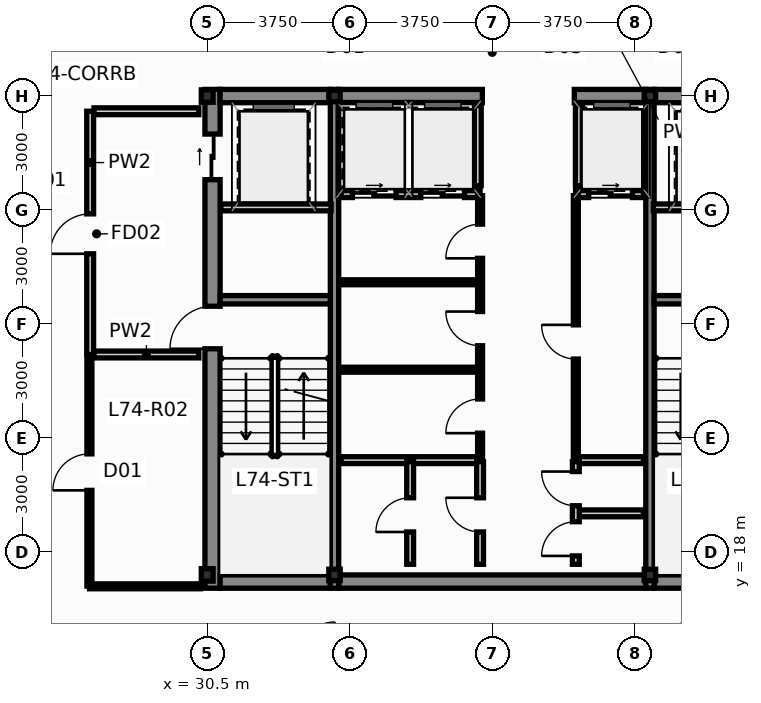
"""IFC4 building model, lengths in metres.
Left out: names, types, materials, properties, quantities, classifications, styles, units other than length and angle.
Written with IfcOpenShell. Run it as: python <this file> out.ifc"""

import sys

from ifc_helpers import new_model, si_unit, direction, frame, frame_2d, origin, origin_2d, place, context, subcontext, project, spatial, rectangle, hollow_rectangle, i_section, extrude, source, transform, mapped, element, fill, save


model = new_model("IFC4")
c1 = context("Model", 3, precision=1e-05, world=origin(), true_north=direction((0.0, 1.0)))
c2 = subcontext(c1, "Body", "Model", "MODEL_VIEW")
j1 = project(units=[si_unit("LENGTHUNIT", "METRE"), si_unit("PLANEANGLEUNIT", "RADIAN")], contexts=[c1])
p1 = place(None, origin())
s1 = spatial("IfcSite", under=j1, at=p1, CompositionType="ELEMENT")
p2 = place(p1, origin())
s2 = spatial("IfcBuilding", under=s1, at=p2, CompositionType="ELEMENT")
p3 = place(p2, frame((0.0, 0.0, 280.95)))
s3 = spatial("IfcBuildingStorey", under=s2, at=p3, CompositionType="ELEMENT", Elevation=280.95)
m1 = source(origin(), c2, "Body", "SweptSolid", [
    extrude(i_section(OverallWidth=0.311, OverallDepth=0.327, WebThickness=0.016, FlangeThickness=0.025, at=origin_2d()), origin(), (0.0, 0.0, 1.0), 3.65),
])
for number, where, z_axis, x_axis in (
    (1, (30.5, 17.4, 0.0), (0.0, 0.0, 1.0), (1.0, 0.0, 0.0)),
    (2, (30.5, 30.0, 0.0), (0.0, 0.0, 1.0), (1.0, 0.0, 0.0)),
):
    element("IfcColumn", number, at=place(p3, frame(where, z_axis=z_axis, x_axis=x_axis)), inside=s3, PredefinedType="COLUMN", context=c2, shape_type="MappedRepresentation", body=[
        mapped(m1, transform((0.0, 0.0, 0.0), scale=1.0)),
    ])
m2 = source(origin(), c2, "Body", "SweptSolid", [
    extrude(hollow_rectangle(XDim=0.3, YDim=0.3, WallThickness=0.012, at=origin_2d()), origin(), (0.0, 0.0, 1.0), 3.65),
])
for number, where, z_axis, x_axis in (
    (3, (33.85, 17.4, 0.0), (0.0, 0.0, 1.0), (1.0, 0.0, 0.0)),
    (4, (42.15, 17.4, 0.0), (0.0, 0.0, 1.0), (1.0, 0.0, 0.0)),
    (5, (33.85, 30.0, 0.0), (0.0, 0.0, 1.0), (1.0, 0.0, 0.0)),
    (6, (42.15, 30.0, 0.0), (0.0, 0.0, 1.0), (1.0, 0.0, 0.0)),
):
    element("IfcColumn", number, at=place(p3, frame(where, z_axis=z_axis, x_axis=x_axis)), inside=s3, PredefinedType="COLUMN", context=c2, shape_type="MappedRepresentation", body=[
        mapped(m2, transform((0.0, 0.0, 0.0), scale=1.0)),
    ])
p4 = place(p3, frame((30.64, 17.05, 0.0), z_axis=(0.0, 0.0, 1.0), x_axis=(0.0, 1.0, 0.0)))
e7 = element("IfcWall", 7, at=p4, inside=s3, PredefinedType="SHEAR", context=c2, shape_type="SweptSolid", body=[
    extrude(rectangle(XDim=13.125, YDim=0.4, at=frame_2d((6.562, 0.0))), origin(), (0.0, 0.0, 1.0), 3.65),
])
p5 = place(p4, frame((6.3, 0.0, 0.0)))
e8 = element("IfcOpeningElement", 8, at=p5, cuts=e7, PredefinedType="OPENING", context=c2, shape_type="SweptSolid", body=[
    extrude(rectangle(XDim=1.12, YDim=2.15, at=frame_2d((0.56, 1.075))), frame((0.0, 0.212, 0.0), z_axis=(0.0, -1.0, 0.0), x_axis=(1.0, 0.0, 0.0)), (0.0, 0.0, 1.0), 0.424),
])
p6 = place(p4, frame((10.75, 0.0, 0.0)))
e9 = element("IfcOpeningElement", 9, at=p6, cuts=e7, PredefinedType="OPENING", context=c2, shape_type="SweptSolid", body=[
    extrude(rectangle(XDim=1.2, YDim=2.2, at=frame_2d((0.6, 1.1))), frame((0.0, 0.212, 0.0), z_axis=(0.0, -1.0, 0.0), x_axis=(1.0, 0.0, 0.0)), (0.0, 0.0, 1.0), 0.424),
])
p7 = place(p3, frame((30.84, 17.225, 0.0), z_axis=(0.0, 0.0, 1.0), x_axis=(1.0, 0.0, 0.0)))
e10 = element("IfcWall", 10, at=p7, inside=s3, PredefinedType="SHEAR", context=c2, shape_type="SweptSolid", body=[
    extrude(rectangle(XDim=2.9, YDim=0.35, at=frame_2d((1.45, 0.0))), origin(), (0.0, 0.0, 1.0), 3.65),
])
p8 = place(p3, frame((33.96, 17.225, 0.0), z_axis=(0.0, 0.0, 1.0), x_axis=(1.0, 0.0, 0.0)))
e11 = element("IfcWall", 11, at=p8, inside=s3, PredefinedType="SHEAR", context=c2, shape_type="SweptSolid", body=[
    extrude(rectangle(XDim=8.08, YDim=0.35, at=frame_2d((4.04, 0.0))), origin(), (0.0, 0.0, 1.0), 3.65),
])
for number, where, z_axis, x_axis in (
    (12, (42.26, 17.225, 0.0), (0.0, 0.0, 1.0), (1.0, 0.0, 0.0)),
    (13, (30.84, 30.0, 0.0), (0.0, 0.0, 1.0), (1.0, 0.0, 0.0)),
):
    element("IfcWall", number, at=place(p3, frame(where, z_axis=z_axis, x_axis=x_axis)), inside=s3, PredefinedType="SHEAR", context=c2, shape_type="SweptSolid", body=[
        extrude(rectangle(XDim=2.9, YDim=0.35, at=frame_2d((1.45, 0.0))), origin(), (0.0, 0.0, 1.0), 3.65),
    ])
p9 = place(p3, frame((33.96, 30.0, 0.0), z_axis=(0.0, 0.0, 1.0), x_axis=(1.0, 0.0, 0.0)))
e14 = element("IfcWall", 14, at=p9, inside=s3, PredefinedType="SHEAR", context=c2, shape_type="SweptSolid", body=[
    extrude(rectangle(XDim=3.78, YDim=0.35, at=frame_2d((1.89, 0.0))), origin(), (0.0, 0.0, 1.0), 3.65),
])
p10 = place(p3, frame((40.16, 30.0, 0.0), z_axis=(0.0, 0.0, 1.0), x_axis=(1.0, 0.0, 0.0)))
e15 = element("IfcWall", 15, at=p10, inside=s3, PredefinedType="SHEAR", context=c2, shape_type="SweptSolid", body=[
    extrude(rectangle(XDim=1.88, YDim=0.35, at=frame_2d((0.94, 0.0))), origin(), (0.0, 0.0, 1.0), 3.65),
])
p11 = place(p3, frame((42.26, 30.0, 0.0), z_axis=(0.0, 0.0, 1.0), x_axis=(1.0, 0.0, 0.0)))
e16 = element("IfcWall", 16, at=p11, inside=s3, PredefinedType="SHEAR", context=c2, shape_type="SweptSolid", body=[
    extrude(rectangle(XDim=2.9, YDim=0.35, at=frame_2d((1.45, 0.0))), origin(), (0.0, 0.0, 1.0), 3.65),
])
for number, where, z_axis, x_axis in (
    (17, (33.85, 17.05, 0.0), (0.0, 0.0, 1.0), (0.0, 1.0, 0.0)),
    (18, (42.15, 17.05, 0.0), (0.0, 0.0, 1.0), (0.0, 1.0, 0.0)),
):
    element("IfcWall", number, at=place(p3, frame(where, z_axis=z_axis, x_axis=x_axis)), inside=s3, PredefinedType="SHEAR", context=c2, shape_type="SweptSolid", body=[
        extrude(rectangle(XDim=13.125, YDim=0.22, at=frame_2d((6.562, 0.0))), origin(), (0.0, 0.0, 1.0), 3.65),
    ])
for number, where, z_axis, x_axis in (
    (19, (30.84, 24.64, 0.0), (0.0, 0.0, 1.0), (1.0, 0.0, 0.0)),
    (20, (42.26, 24.64, 0.0), (0.0, 0.0, 1.0), (1.0, 0.0, 0.0)),
):
    element("IfcWall", number, at=place(p3, frame(where, z_axis=z_axis, x_axis=x_axis)), inside=s3, PredefinedType="SHEAR", context=c2, shape_type="SweptSolid", body=[
        extrude(rectangle(XDim=2.9, YDim=0.22, at=frame_2d((1.45, 0.0))), origin(), (0.0, 0.0, 1.0), 3.65),
    ])
p12 = place(p3, frame((34.02, 27.42, 0.0), z_axis=(0.0, 0.0, 1.0), x_axis=(1.0, 0.0, 0.0)))
e21 = element("IfcWall", 21, at=p12, inside=s3, PredefinedType="PARTITIONING", context=c2, shape_type="SweptSolid", body=[
    extrude(rectangle(XDim=3.66, YDim=0.18, at=frame_2d((1.83, 0.0))), origin(), (0.0, 0.0, 1.0), 3.25),
])
p13 = place(p12, frame((0.3, 0.0, 0.0)))
e22 = element("IfcOpeningElement", 22, at=p13, cuts=e21, PredefinedType="OPENING", context=c2, shape_type="SweptSolid", body=[
    extrude(rectangle(XDim=1.15, YDim=2.2, at=frame_2d((0.575, 1.1))), frame((0.0, 0.102, 0.0), z_axis=(0.0, -1.0, 0.0), x_axis=(1.0, 0.0, 0.0)), (0.0, 0.0, 1.0), 0.204),
])
p14 = place(p12, frame((2.1, 0.0, 0.0)))
e23 = element("IfcOpeningElement", 23, at=p14, cuts=e21, PredefinedType="OPENING", context=c2, shape_type="SweptSolid", body=[
    extrude(rectangle(XDim=1.15, YDim=2.2, at=frame_2d((0.575, 1.1))), frame((0.0, 0.102, 0.0), z_axis=(0.0, -1.0, 0.0), x_axis=(1.0, 0.0, 0.0)), (0.0, 0.0, 1.0), 0.204),
])
p15 = place(p3, frame((40.22, 27.42, 0.0), z_axis=(0.0, 0.0, 1.0), x_axis=(1.0, 0.0, 0.0)))
e24 = element("IfcWall", 24, at=p15, inside=s3, PredefinedType="PARTITIONING", context=c2, shape_type="SweptSolid", body=[
    extrude(rectangle(XDim=1.76, YDim=0.18, at=frame_2d((0.88, 0.0))), origin(), (0.0, 0.0, 1.0), 3.25),
])
p16 = place(p15, frame((0.32, 0.0, 0.0)))
e25 = element("IfcOpeningElement", 25, at=p16, cuts=e24, PredefinedType="OPENING", context=c2, shape_type="SweptSolid", body=[
    extrude(rectangle(XDim=1.15, YDim=2.2, at=frame_2d((0.575, 1.1))), frame((0.0, 0.102, 0.0), z_axis=(0.0, -1.0, 0.0), x_axis=(1.0, 0.0, 0.0)), (0.0, 0.0, 1.0), 0.204),
])
for number, where, z_axis, x_axis in (
    (26, (37.62, 27.64, 0.0), (0.0, 0.0, 1.0), (0.0, 1.0, 0.0)),
    (27, (40.28, 27.64, 0.0), (0.0, 0.0, 1.0), (0.0, 1.0, 0.0)),
):
    element("IfcWall", number, at=place(p3, frame(where, z_axis=z_axis, x_axis=x_axis)), inside=s3, PredefinedType="PARTITIONING", context=c2, shape_type="SweptSolid", body=[
        extrude(rectangle(XDim=2.11, YDim=0.18, at=frame_2d((1.055, 0.0))), origin(), (0.0, 0.0, 1.0), 3.25),
    ])
p17 = place(p3, frame((27.42, 23.2, 0.0), z_axis=(0.0, 0.0, 1.0), x_axis=(0.0, 1.0, 0.0)))
e28 = element("IfcWall", 28, at=p17, inside=s3, PredefinedType="PARTITIONING", context=c2, shape_type="SweptSolid", body=[
    extrude(rectangle(XDim=6.4, YDim=0.18, at=frame_2d((3.2, 0.0))), origin(), (0.0, 0.0, 1.0), 2.979),
])
p18 = place(p17, frame((2.65, 0.0, 0.0)))
e29 = element("IfcOpeningElement", 29, at=p18, cuts=e28, PredefinedType="OPENING", context=c2, shape_type="SweptSolid", body=[
    extrude(rectangle(XDim=1.05, YDim=2.15, at=frame_2d((0.525, 1.075))), frame((0.0, 0.102, 0.0), z_axis=(0.0, -1.0, 0.0), x_axis=(1.0, 0.0, 0.0)), (0.0, 0.0, 1.0), 0.204),
])
for number, where, z_axis, x_axis in (
    (30, (27.52, 23.2, 0.0), (0.0, 0.0, 1.0), (1.0, 0.0, 0.0)),
    (31, (27.52, 29.6, 0.0), (0.0, 0.0, 1.0), (1.0, 0.0, 0.0)),
):
    element("IfcWall", number, at=place(p3, frame(where, z_axis=z_axis, x_axis=x_axis)), inside=s3, PredefinedType="PARTITIONING", context=c2, shape_type="SweptSolid", body=[
        extrude(rectangle(XDim=2.76, YDim=0.18, at=frame_2d((1.38, 0.0))), origin(), (0.0, 0.0, 1.0), 3.25),
    ])
for number, where, z_axis, x_axis in (
    (32, (30.86, 27.07, 0.0), (0.0, 0.0, 1.0), (1.0, 0.0, 0.0)),
    (33, (42.24, 27.07, 0.0), (0.0, 0.0, 1.0), (1.0, 0.0, 0.0)),
):
    element("IfcWall", number, at=place(p3, frame(where, z_axis=z_axis, x_axis=x_axis)), inside=s3, PredefinedType="PARTITIONING", context=c2, shape_type="SweptSolid", body=[
        extrude(rectangle(XDim=2.9, YDim=0.18, at=frame_2d((1.45, 0.0))), origin(), (0.0, 0.0, 1.0), 3.25),
    ])
p19 = place(p3, frame((34.02, 20.42, 0.0), z_axis=(0.0, 0.0, 1.0), x_axis=(1.0, 0.0, 0.0)))
e34 = element("IfcWall", 34, at=p19, inside=s3, PredefinedType="PARTITIONING", context=c2, shape_type="SweptSolid", body=[
    extrude(rectangle(XDim=3.64, YDim=0.18, at=frame_2d((1.82, 0.0))), origin(), (0.0, 0.0, 1.0), 3.25),
])
p20 = place(p3, frame((40.22, 20.42, 0.0), z_axis=(0.0, 0.0, 1.0), x_axis=(1.0, 0.0, 0.0)))
e35 = element("IfcWall", 35, at=p20, inside=s3, PredefinedType="PARTITIONING", context=c2, shape_type="SweptSolid", body=[
    extrude(rectangle(XDim=1.76, YDim=0.18, at=frame_2d((0.88, 0.0))), origin(), (0.0, 0.0, 1.0), 3.25),
])
for number, where, z_axis, x_axis in (
    (36, (34.02, 22.8, 0.0), (0.0, 0.0, 1.0), (1.0, 0.0, 0.0)),
    (37, (34.02, 25.1, 0.0), (0.0, 0.0, 1.0), (1.0, 0.0, 0.0)),
):
    element("IfcWall", number, at=place(p3, frame(where, z_axis=z_axis, x_axis=x_axis)), inside=s3, PredefinedType="PARTITIONING", context=c2, shape_type="SweptSolid", body=[
        extrude(rectangle(XDim=3.58, YDim=0.13, at=frame_2d((1.79, 0.0))), origin(), (0.0, 0.0, 1.0), 3.25),
    ])
p21 = place(p3, frame((37.68, 20.48, 0.0), z_axis=(0.0, 0.0, 1.0), x_axis=(0.0, 1.0, 0.0)))
e38 = element("IfcWall", 38, at=p21, inside=s3, PredefinedType="PARTITIONING", context=c2, shape_type="SweptSolid", body=[
    extrude(rectangle(XDim=6.9, YDim=0.13, at=frame_2d((3.45, 0.0))), origin(), (0.0, 0.0, 1.0), 3.25),
])
p22 = place(p21, frame((0.65, 0.0, 0.0)))
e39 = element("IfcOpeningElement", 39, at=p22, cuts=e38, PredefinedType="OPENING", context=c2, shape_type="SweptSolid", body=[
    extrude(rectangle(XDim=0.9, YDim=2.1, at=frame_2d((0.45, 1.05))), frame((0.0, 0.077, 0.0), z_axis=(0.0, -1.0, 0.0), x_axis=(1.0, 0.0, 0.0)), (0.0, 0.0, 1.0), 0.154),
])
p23 = place(p21, frame((2.95, 0.0, 0.0)))
e40 = element("IfcOpeningElement", 40, at=p23, cuts=e38, PredefinedType="OPENING", context=c2, shape_type="SweptSolid", body=[
    extrude(rectangle(XDim=0.9, YDim=2.1, at=frame_2d((0.45, 1.05))), frame((0.0, 0.077, 0.0), z_axis=(0.0, -1.0, 0.0), x_axis=(1.0, 0.0, 0.0)), (0.0, 0.0, 1.0), 0.154),
])
p24 = place(p21, frame((5.25, 0.0, 0.0)))
e41 = element("IfcOpeningElement", 41, at=p24, cuts=e38, PredefinedType="OPENING", context=c2, shape_type="SweptSolid", body=[
    extrude(rectangle(XDim=0.9, YDim=2.1, at=frame_2d((0.45, 1.05))), frame((0.0, 0.077, 0.0), z_axis=(0.0, -1.0, 0.0), x_axis=(1.0, 0.0, 0.0)), (0.0, 0.0, 1.0), 0.154),
])
p25 = place(p3, frame((40.2, 20.48, 0.0), z_axis=(0.0, 0.0, 1.0), x_axis=(0.0, 1.0, 0.0)))
e42 = element("IfcWall", 42, at=p25, inside=s3, PredefinedType="PARTITIONING", context=c2, shape_type="SweptSolid", body=[
    extrude(rectangle(XDim=6.9, YDim=0.13, at=frame_2d((3.45, 0.0))), origin(), (0.0, 0.0, 1.0), 3.25),
])
p26 = place(p25, frame((2.6, 0.0, 0.0)))
e43 = element("IfcOpeningElement", 43, at=p26, cuts=e42, PredefinedType="OPENING", context=c2, shape_type="SweptSolid", body=[
    extrude(rectangle(XDim=0.9, YDim=2.1, at=frame_2d((0.45, 1.05))), frame((0.0, 0.077, 0.0), z_axis=(0.0, -1.0, 0.0), x_axis=(1.0, 0.0, 0.0)), (0.0, 0.0, 1.0), 0.154),
])
p27 = place(p3, frame((35.84, 17.68, 0.0), z_axis=(0.0, 0.0, 1.0), x_axis=(0.0, 1.0, 0.0)))
e44 = element("IfcWall", 44, at=p27, inside=s3, PredefinedType="PARTITIONING", context=c2, shape_type="SweptSolid", body=[
    extrude(rectangle(XDim=2.7, YDim=0.18, at=frame_2d((1.35, 0.0))), origin(), (0.0, 0.0, 1.0), 3.25),
])
p28 = place(p27, frame((0.85, 0.0, 0.0)))
e45 = element("IfcOpeningElement", 45, at=p28, cuts=e44, PredefinedType="OPENING", context=c2, shape_type="SweptSolid", body=[
    extrude(rectangle(XDim=0.9, YDim=2.1, at=frame_2d((0.45, 1.05))), frame((0.0, 0.102, 0.0), z_axis=(0.0, -1.0, 0.0), x_axis=(1.0, 0.0, 0.0)), (0.0, 0.0, 1.0), 0.204),
])
p29 = place(p3, frame((37.68, 17.68, 0.0), z_axis=(0.0, 0.0, 1.0), x_axis=(0.0, 1.0, 0.0)))
e46 = element("IfcWall", 46, at=p29, inside=s3, PredefinedType="PARTITIONING", context=c2, shape_type="SweptSolid", body=[
    extrude(rectangle(XDim=2.7, YDim=0.18, at=frame_2d((1.35, 0.0))), origin(), (0.0, 0.0, 1.0), 3.25),
])
p30 = place(p29, frame((0.85, 0.0, 0.0)))
e47 = element("IfcOpeningElement", 47, at=p30, cuts=e46, PredefinedType="OPENING", context=c2, shape_type="SweptSolid", body=[
    extrude(rectangle(XDim=0.9, YDim=2.1, at=frame_2d((0.45, 1.05))), frame((0.0, 0.102, 0.0), z_axis=(0.0, -1.0, 0.0), x_axis=(1.0, 0.0, 0.0)), (0.0, 0.0, 1.0), 0.204),
])
p31 = place(p3, frame((40.28, 19.02, 0.0), z_axis=(0.0, 0.0, 1.0), x_axis=(1.0, 0.0, 0.0)))
e48 = element("IfcWall", 48, at=p31, inside=s3, PredefinedType="PARTITIONING", context=c2, shape_type="SweptSolid", body=[
    extrude(rectangle(XDim=1.7, YDim=0.18, at=frame_2d((0.85, 0.0))), origin(), (0.0, 0.0, 1.0), 3.25),
])
p32 = place(p3, frame((40.2, 17.68, 0.0), z_axis=(0.0, 0.0, 1.0), x_axis=(0.0, 1.0, 0.0)))
e49 = element("IfcWall", 49, at=p32, inside=s3, PredefinedType="PARTITIONING", context=c2, shape_type="SweptSolid", body=[
    extrude(rectangle(XDim=2.7, YDim=0.18, at=frame_2d((1.35, 0.0))), origin(), (0.0, 0.0, 1.0), 3.25),
])
p33 = place(p32, frame((0.22, 0.0, 0.0)))
e50 = element("IfcOpeningElement", 50, at=p33, cuts=e49, PredefinedType="OPENING", context=c2, shape_type="SweptSolid", body=[
    extrude(rectangle(XDim=0.9, YDim=2.1, at=frame_2d((0.45, 1.05))), frame((0.0, 0.102, 0.0), z_axis=(0.0, -1.0, 0.0), x_axis=(1.0, 0.0, 0.0)), (0.0, 0.0, 1.0), 0.204),
])
p34 = place(p32, frame((1.54, 0.0, 0.0)))
e51 = element("IfcOpeningElement", 51, at=p34, cuts=e49, PredefinedType="OPENING", context=c2, shape_type="SweptSolid", body=[
    extrude(rectangle(XDim=0.9, YDim=2.1, at=frame_2d((0.45, 1.05))), frame((0.0, 0.102, 0.0), z_axis=(0.0, -1.0, 0.0), x_axis=(1.0, 0.0, 0.0)), (0.0, 0.0, 1.0), 0.204),
])
p35 = place(p3, frame((27.4, 17.105, 0.0), z_axis=(0.0, 0.0, 1.0), x_axis=(0.0, 1.0, 0.0)))
e52 = element("IfcWall", 52, at=p35, inside=s3, PredefinedType="PARTITIONING", context=c2, shape_type="SweptSolid", body=[
    extrude(rectangle(XDim=6.0, YDim=0.13, at=frame_2d((3.0, 0.0))), origin(), (0.0, 0.0, 1.0), 2.979),
])
p36 = place(p35, frame((2.52, 0.0, 0.0)))
e53 = element("IfcOpeningElement", 53, at=p36, cuts=e52, PredefinedType="OPENING", context=c2, shape_type="SweptSolid", body=[
    extrude(rectangle(XDim=0.96, YDim=2.15, at=frame_2d((0.48, 1.075))), frame((0.0, 0.077, 0.0), z_axis=(0.0, -1.0, 0.0), x_axis=(1.0, 0.0, 0.0)), (0.0, 0.0, 1.0), 0.154),
])
p37 = place(p3, frame((30.325, 17.1, 0.0), z_axis=(0.0, 0.0, 1.0), x_axis=(-1.0, 0.0, 0.0)))
e54 = element("IfcWall", 54, at=p37, inside=s3, PredefinedType="PARTITIONING", context=c2, shape_type="SweptSolid", body=[
    extrude(rectangle(XDim=2.92, YDim=0.13, at=frame_2d((1.46, 0.0))), origin(), (0.0, 0.0, 1.0), 2.835),
])
p38 = place(p5, origin())
e55 = element("IfcDoor", 55, at=p38, inside=s3, OperationType="SINGLE_SWING_LEFT", PredefinedType="DOOR", context=c2, shape_type="SweptSolid", body=[
    extrude(rectangle(XDim=1.12, YDim=2.15, at=frame_2d((0.56, 1.075))), frame((0.0, 0.025, 0.0), z_axis=(0.0, -1.0, 0.0), x_axis=(1.0, 0.0, 0.0)), (0.0, 0.0, 1.0), 0.05),
])
fill(e8, e55)
p39 = place(p6, origin())
e56 = element("IfcDoor", 56, at=p39, inside=s3, OperationType="SLIDING_TO_LEFT", PredefinedType="DOOR", context=c2, shape_type="SweptSolid", body=[
    extrude(rectangle(XDim=1.2, YDim=2.2, at=frame_2d((0.6, 1.1))), frame((0.0, 0.025, 0.0), z_axis=(0.0, -1.0, 0.0), x_axis=(1.0, 0.0, 0.0)), (0.0, 0.0, 1.0), 0.05),
])
fill(e9, e56)
p40 = place(p13, origin())
e57 = element("IfcDoor", 57, at=p40, inside=s3, OperationType="SLIDING_TO_RIGHT", PredefinedType="DOOR", context=c2, shape_type="SweptSolid", body=[
    extrude(rectangle(XDim=1.15, YDim=2.2, at=frame_2d((0.575, 1.1))), frame((0.0, 0.025, 0.0), z_axis=(0.0, -1.0, 0.0), x_axis=(1.0, 0.0, 0.0)), (0.0, 0.0, 1.0), 0.05),
])
fill(e22, e57)
p41 = place(p14, origin())
e58 = element("IfcDoor", 58, at=p41, inside=s3, OperationType="SLIDING_TO_LEFT", PredefinedType="DOOR", context=c2, shape_type="SweptSolid", body=[
    extrude(rectangle(XDim=1.15, YDim=2.2, at=frame_2d((0.575, 1.1))), frame((0.0, 0.025, 0.0), z_axis=(0.0, -1.0, 0.0), x_axis=(1.0, 0.0, 0.0)), (0.0, 0.0, 1.0), 0.05),
])
fill(e23, e58)
p42 = place(p16, origin())
e59 = element("IfcDoor", 59, at=p42, inside=s3, OperationType="SLIDING_TO_RIGHT", PredefinedType="DOOR", context=c2, shape_type="SweptSolid", body=[
    extrude(rectangle(XDim=1.15, YDim=2.2, at=frame_2d((0.575, 1.1))), frame((0.0, 0.025, 0.0), z_axis=(0.0, -1.0, 0.0), x_axis=(1.0, 0.0, 0.0)), (0.0, 0.0, 1.0), 0.05),
])
fill(e25, e59)
p43 = place(p18, origin())
e60 = element("IfcDoor", 60, at=p43, inside=s3, OperationType="SINGLE_SWING_LEFT", PredefinedType="DOOR", context=c2, shape_type="SweptSolid", body=[
    extrude(rectangle(XDim=1.05, YDim=2.15, at=frame_2d((0.525, 1.075))), frame((0.0, 0.025, 0.0), z_axis=(0.0, -1.0, 0.0), x_axis=(1.0, 0.0, 0.0)), (0.0, 0.0, 1.0), 0.05),
])
fill(e29, e60)
p44 = place(p22, origin())
e61 = element("IfcDoor", 61, at=p44, inside=s3, OperationType="SINGLE_SWING_LEFT", PredefinedType="DOOR", context=c2, shape_type="SweptSolid", body=[
    extrude(rectangle(XDim=0.9, YDim=2.1, at=frame_2d((0.45, 1.05))), frame((0.0, 0.025, 0.0), z_axis=(0.0, -1.0, 0.0), x_axis=(1.0, 0.0, 0.0)), (0.0, 0.0, 1.0), 0.05),
])
fill(e39, e61)
p45 = place(p23, origin())
e62 = element("IfcDoor", 62, at=p45, inside=s3, OperationType="SINGLE_SWING_RIGHT", PredefinedType="DOOR", context=c2, shape_type="SweptSolid", body=[
    extrude(rectangle(XDim=0.9, YDim=2.1, at=frame_2d((0.45, 1.05))), frame((0.0, 0.025, 0.0), z_axis=(0.0, -1.0, 0.0), x_axis=(1.0, 0.0, 0.0)), (0.0, 0.0, 1.0), 0.05),
])
fill(e40, e62)
p46 = place(p24, origin())
e63 = element("IfcDoor", 63, at=p46, inside=s3, OperationType="SINGLE_SWING_LEFT", PredefinedType="DOOR", context=c2, shape_type="SweptSolid", body=[
    extrude(rectangle(XDim=0.9, YDim=2.1, at=frame_2d((0.45, 1.05))), frame((0.0, 0.025, 0.0), z_axis=(0.0, -1.0, 0.0), x_axis=(1.0, 0.0, 0.0)), (0.0, 0.0, 1.0), 0.05),
])
fill(e41, e63)
p47 = place(p26, origin())
e64 = element("IfcDoor", 64, at=p47, inside=s3, OperationType="SINGLE_SWING_RIGHT", PredefinedType="DOOR", context=c2, shape_type="SweptSolid", body=[
    extrude(rectangle(XDim=0.9, YDim=2.1, at=frame_2d((0.45, 1.05))), frame((0.0, 0.025, 0.0), z_axis=(0.0, -1.0, 0.0), x_axis=(1.0, 0.0, 0.0)), (0.0, 0.0, 1.0), 0.05),
])
fill(e43, e64)
p48 = place(p28, origin())
e65 = element("IfcDoor", 65, at=p48, inside=s3, OperationType="SINGLE_SWING_LEFT", PredefinedType="DOOR", context=c2, shape_type="SweptSolid", body=[
    extrude(rectangle(XDim=0.9, YDim=2.1, at=frame_2d((0.45, 1.05))), frame((0.0, 0.025, 0.0), z_axis=(0.0, -1.0, 0.0), x_axis=(1.0, 0.0, 0.0)), (0.0, 0.0, 1.0), 0.05),
])
fill(e45, e65)
p49 = place(p30, origin())
e66 = element("IfcDoor", 66, at=p49, inside=s3, OperationType="SINGLE_SWING_RIGHT", PredefinedType="DOOR", context=c2, shape_type="SweptSolid", body=[
    extrude(rectangle(XDim=0.9, YDim=2.1, at=frame_2d((0.45, 1.05))), frame((0.0, 0.025, 0.0), z_axis=(0.0, -1.0, 0.0), x_axis=(1.0, 0.0, 0.0)), (0.0, 0.0, 1.0), 0.05),
])
fill(e47, e66)
p50 = place(p33, origin())
e67 = element("IfcDoor", 67, at=p50, inside=s3, OperationType="SINGLE_SWING_LEFT", PredefinedType="DOOR", context=c2, shape_type="SweptSolid", body=[
    extrude(rectangle(XDim=0.9, YDim=2.1, at=frame_2d((0.45, 1.05))), frame((0.0, 0.025, 0.0), z_axis=(0.0, -1.0, 0.0), x_axis=(1.0, 0.0, 0.0)), (0.0, 0.0, 1.0), 0.05),
])
fill(e50, e67)
p51 = place(p34, origin())
e68 = element("IfcDoor", 68, at=p51, inside=s3, OperationType="SINGLE_SWING_RIGHT", PredefinedType="DOOR", context=c2, shape_type="SweptSolid", body=[
    extrude(rectangle(XDim=0.9, YDim=2.1, at=frame_2d((0.45, 1.05))), frame((0.0, 0.025, 0.0), z_axis=(0.0, -1.0, 0.0), x_axis=(1.0, 0.0, 0.0)), (0.0, 0.0, 1.0), 0.05),
])
fill(e51, e68)
p52 = place(p36, origin())
e69 = element("IfcDoor", 69, at=p52, inside=s3, OperationType="SINGLE_SWING_LEFT", PredefinedType="DOOR", context=c2, shape_type="SweptSolid", body=[
    extrude(rectangle(XDim=0.96, YDim=2.15, at=frame_2d((0.48, 1.075))), frame((0.0, 0.025, 0.0), z_axis=(0.0, -1.0, 0.0), x_axis=(1.0, 0.0, 0.0)), (0.0, 0.0, 1.0), 0.05),
])
fill(e53, e69)
save(model, sys.argv[1])
